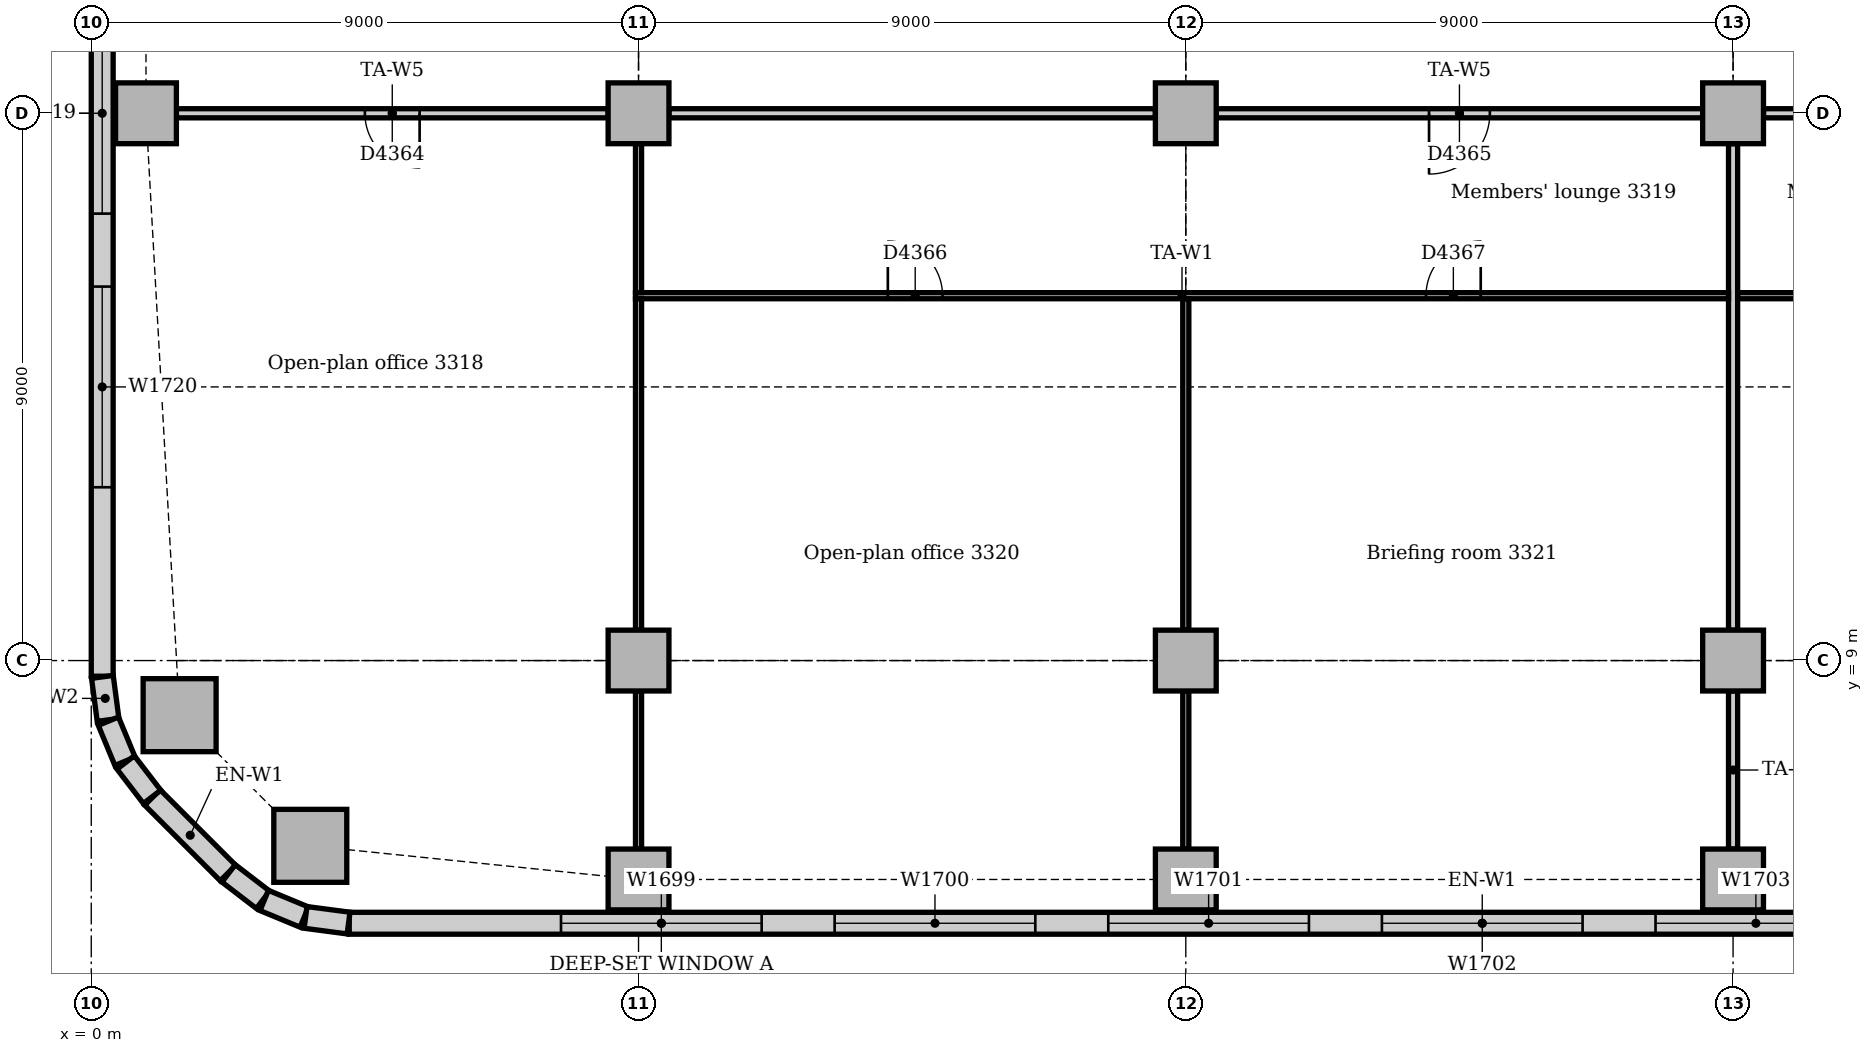
"""IFC4 building model, lengths in metres.
Left out: names, types, materials, properties, quantities, classifications, styles, units other than length and angle.
Written with IfcOpenShell. Run it as: python <this file> out.ifc"""

import sys

from ifc_helpers import new_model, si_unit, direction, frame, frame_2d, origin, origin_2d, place, context, subcontext, project, spatial, rectangle, extrude, element, fill, save


model = new_model("IFC4")
c1 = context("Model", 3, precision=1e-05, world=origin(), true_north=direction((0.0, 1.0)))
c2 = subcontext(c1, "Body", "Model", "MODEL_VIEW")
j1 = project(units=[si_unit("LENGTHUNIT", "METRE"), si_unit("PLANEANGLEUNIT", "RADIAN")], contexts=[c1])
p1 = place(None, origin())
s1 = spatial("IfcSite", under=j1, at=p1, CompositionType="ELEMENT")
p2 = place(p1, origin())
s2 = spatial("IfcBuilding", under=s1, at=p2, CompositionType="ELEMENT")
p3 = place(p2, frame((0.0, 0.0, 140.0)))
s3 = spatial("IfcBuildingStorey", under=s2, at=p3, CompositionType="ELEMENT", Elevation=140.0)
for number, where, z_axis, x_axis in (
    (1, (3.602, 5.953, 0.0), (0.0, 0.0, 1.0), (1.0, 0.0, 0.0)),
    (2, (1.453, 8.102, 0.0), (0.0, 0.0, 1.0), (1.0, 0.0, 0.0)),
):
    element("IfcColumn", number, at=place(p3, frame(where, z_axis=z_axis, x_axis=x_axis)), inside=s3, PredefinedType="COLUMN", context=c2, shape_type="SweptSolid", body=[
        extrude(rectangle(XDim=1.2, YDim=1.2, at=origin_2d()), origin(), (0.0, 0.0, 1.0), 3.7),
    ])
for number, where, z_axis, x_axis in (
    (3, (9.0, 5.4, 0.0), (0.0, 0.0, 1.0), (1.0, 0.0, 0.0)),
    (4, (18.0, 5.4, 0.0), (0.0, 0.0, 1.0), (1.0, 0.0, 0.0)),
    (5, (27.0, 5.4, 0.0), (0.0, 0.0, 1.0), (1.0, 0.0, 0.0)),
    (6, (0.9, 18.0, 0.0), (0.0, 0.0, 1.0), (1.0, 0.0, 0.0)),
    (7, (9.0, 9.0, 0.0), (0.0, 0.0, 1.0), (1.0, 0.0, 0.0)),
    (8, (9.0, 18.0, 0.0), (0.0, 0.0, 1.0), (1.0, 0.0, 0.0)),
    (9, (18.0, 9.0, 0.0), (0.0, 0.0, 1.0), (1.0, 0.0, 0.0)),
    (10, (18.0, 18.0, 0.0), (0.0, 0.0, 1.0), (1.0, 0.0, 0.0)),
    (11, (27.0, 9.0, 0.0), (0.0, 0.0, 1.0), (1.0, 0.0, 0.0)),
    (12, (27.0, 18.0, 0.0), (0.0, 0.0, 1.0), (1.0, 0.0, 0.0)),
):
    element("IfcColumn", number, at=place(p3, frame(where, z_axis=z_axis, x_axis=x_axis)), inside=s3, PredefinedType="COLUMN", context=c2, shape_type="SweptSolid", body=[
        extrude(rectangle(XDim=1.0, YDim=1.0, at=origin_2d()), origin(), (0.0, 0.0, 1.0), 3.7),
    ])
p4 = place(p3, frame((4.243, 4.68, 0.0), z_axis=(0.0, 0.0, 1.0), x_axis=(1.0, 0.0, 0.0)))
e13 = element("IfcWall", 13, at=p4, inside=s3, PredefinedType="STANDARD", context=c2, shape_type="SweptSolid", body=[
    extrude(rectangle(XDim=37.265, YDim=0.36, at=frame_2d((18.632, 0.0))), origin(), (0.0, 0.0, 1.0), 3.7),
])
p5 = place(p4, frame((3.482, 0.0, 0.9)))
e14 = element("IfcOpeningElement", 14, at=p5, cuts=e13, PredefinedType="OPENING", context=c2, shape_type="SweptSolid", body=[
    extrude(rectangle(XDim=3.3, YDim=1.6, at=frame_2d((1.65, 0.8))), frame((0.0, 0.19, 0.0), z_axis=(0.0, -1.0, 0.0), x_axis=(1.0, 0.0, 0.0)), (0.0, 0.0, 1.0), 0.38),
])
p6 = place(p4, frame((7.982, 0.0, 0.9)))
e15 = element("IfcOpeningElement", 15, at=p6, cuts=e13, PredefinedType="OPENING", context=c2, shape_type="SweptSolid", body=[
    extrude(rectangle(XDim=3.3, YDim=1.6, at=frame_2d((1.65, 0.8))), frame((0.0, 0.19, 0.0), z_axis=(0.0, -1.0, 0.0), x_axis=(1.0, 0.0, 0.0)), (0.0, 0.0, 1.0), 0.38),
])
p7 = place(p4, frame((12.482, 0.0, 0.9)))
e16 = element("IfcOpeningElement", 16, at=p7, cuts=e13, PredefinedType="OPENING", context=c2, shape_type="SweptSolid", body=[
    extrude(rectangle(XDim=3.3, YDim=1.6, at=frame_2d((1.65, 0.8))), frame((0.0, 0.19, 0.0), z_axis=(0.0, -1.0, 0.0), x_axis=(1.0, 0.0, 0.0)), (0.0, 0.0, 1.0), 0.38),
])
p8 = place(p4, frame((16.982, 0.0, 0.9)))
e17 = element("IfcOpeningElement", 17, at=p8, cuts=e13, PredefinedType="OPENING", context=c2, shape_type="SweptSolid", body=[
    extrude(rectangle(XDim=3.3, YDim=1.6, at=frame_2d((1.65, 0.8))), frame((0.0, 0.19, 0.0), z_axis=(0.0, -1.0, 0.0), x_axis=(1.0, 0.0, 0.0)), (0.0, 0.0, 1.0), 0.38),
])
p9 = place(p4, frame((21.482, 0.0, 0.9)))
e18 = element("IfcOpeningElement", 18, at=p9, cuts=e13, PredefinedType="OPENING", context=c2, shape_type="SweptSolid", body=[
    extrude(rectangle(XDim=3.3, YDim=1.6, at=frame_2d((1.65, 0.8))), frame((0.0, 0.19, 0.0), z_axis=(0.0, -1.0, 0.0), x_axis=(1.0, 0.0, 0.0)), (0.0, 0.0, 1.0), 0.38),
])
p10 = place(p4, frame((25.982, 0.0, 0.9)))
e19 = element("IfcOpeningElement", 19, at=p10, cuts=e13, PredefinedType="OPENING", context=c2, shape_type="SweptSolid", body=[
    extrude(rectangle(XDim=3.3, YDim=1.6, at=frame_2d((1.65, 0.8))), frame((0.0, 0.19, 0.0), z_axis=(0.0, -1.0, 0.0), x_axis=(1.0, 0.0, 0.0)), (0.0, 0.0, 1.0), 0.38),
])
p11 = place(p4, frame((30.482, 0.0, 0.9)))
e20 = element("IfcOpeningElement", 20, at=p11, cuts=e13, PredefinedType="OPENING", context=c2, shape_type="SweptSolid", body=[
    extrude(rectangle(XDim=3.3, YDim=1.6, at=frame_2d((1.65, 0.8))), frame((0.0, 0.19, 0.0), z_axis=(0.0, -1.0, 0.0), x_axis=(1.0, 0.0, 0.0)), (0.0, 0.0, 1.0), 0.38),
])
p12 = place(p3, frame((0.18, 21.0, 0.0), z_axis=(0.0, 0.0, 1.0), x_axis=(0.0, -1.0, 0.0)))
e21 = element("IfcWall", 21, at=p12, inside=s3, PredefinedType="STANDARD", context=c2, shape_type="SweptSolid", body=[
    extrude(rectangle(XDim=12.257, YDim=0.36, at=frame_2d((6.129, 0.0))), origin(), (0.0, 0.0, 1.0), 3.7),
])
p13 = place(p12, frame((1.35, 0.0, 0.9)))
e22 = element("IfcOpeningElement", 22, at=p13, cuts=e21, PredefinedType="OPENING", context=c2, shape_type="SweptSolid", body=[
    extrude(rectangle(XDim=3.3, YDim=1.6, at=frame_2d((1.65, 0.8))), frame((0.0, 0.19, 0.0), z_axis=(0.0, -1.0, 0.0), x_axis=(1.0, 0.0, 0.0)), (0.0, 0.0, 1.0), 0.38),
])
p14 = place(p12, frame((5.85, 0.0, 0.9)))
e23 = element("IfcOpeningElement", 23, at=p14, cuts=e21, PredefinedType="OPENING", context=c2, shape_type="SweptSolid", body=[
    extrude(rectangle(XDim=3.3, YDim=1.6, at=frame_2d((1.65, 0.8))), frame((0.0, 0.19, 0.0), z_axis=(0.0, -1.0, 0.0), x_axis=(1.0, 0.0, 0.0)), (0.0, 0.0, 1.0), 0.38),
])
p15 = place(p3, frame((1.006, 6.749, 0.0), z_axis=(0.0, 0.0, 1.0), x_axis=(0.707106781187, -0.707106781187, 0.0)))
e24 = element("IfcWall", 24, at=p15, inside=s3, PredefinedType="STANDARD", context=c2, shape_type="SweptSolid", body=[
    extrude(rectangle(XDim=1.757, YDim=0.36, at=frame_2d((0.879, 0.0))), origin(), (0.0, 0.0, 1.0), 3.7),
])
for number, where, z_axis, x_axis in (
    (25, (0.183, 8.731, 0.0), (0.0, 0.0, 1.0), (0.131, -0.991, 0.0)),
    (26, (0.282, 8.003, 0.0), (0.0, 0.0, 1.0), (0.383, -0.924, 0.0)),
):
    element("IfcWall", number, at=place(p3, frame(where, z_axis=z_axis, x_axis=x_axis)), inside=s3, PredefinedType="STANDARD", context=c2, shape_type="SweptSolid", body=[
        extrude(rectangle(XDim=0.713, YDim=0.36, at=frame_2d((0.356, 0.0))), origin(), (0.0, 0.0, 1.0), 3.7),
    ])
for number, where, z_axis, x_axis in (
    (27, (0.566, 7.324, 0.0), (0.0, 0.0, 1.0), (0.609, -0.793, 0.0)),
    (28, (2.259, 5.5, 0.0), (0.0, 0.0, 1.0), (0.793, -0.609, 0.0)),
):
    element("IfcWall", number, at=place(p3, frame(where, z_axis=z_axis, x_axis=x_axis)), inside=s3, PredefinedType="STANDARD", context=c2, shape_type="SweptSolid", body=[
        extrude(rectangle(XDim=0.713, YDim=0.36, at=frame_2d((0.357, 0.0))), origin(), (0.0, 0.0, 1.0), 3.7),
    ])
for number, where, z_axis, x_axis in (
    (29, (2.844, 5.055, 0.0), (0.0, 0.0, 1.0), (0.924, -0.383, 0.0)),
    (30, (3.524, 4.776, 0.0), (0.0, 0.0, 1.0), (0.991, -0.131, 0.0)),
):
    element("IfcWall", number, at=place(p3, frame(where, z_axis=z_axis, x_axis=x_axis)), inside=s3, PredefinedType="STANDARD", context=c2, shape_type="SweptSolid", body=[
        extrude(rectangle(XDim=0.713, YDim=0.36, at=frame_2d((0.356, 0.0))), origin(), (0.0, 0.0, 1.0), 3.7),
    ])
p16 = place(p3, frame((27.5, 18.0, 0.0), z_axis=(0.0, 0.0, 1.0), x_axis=(1.0, 0.0, 0.0)))
e31 = element("IfcWall", 31, at=p16, inside=s3, PredefinedType="PARTITIONING", context=c2, shape_type="SweptSolid", body=[
    extrude(rectangle(XDim=8.0, YDim=0.15, at=frame_2d((4.0, 0.0))), origin(), (0.0, 0.0, 1.0), 3.008),
])
p17 = place(p16, frame((3.5, 0.0, 0.0)))
e32 = element("IfcOpeningElement", 32, at=p17, cuts=e31, PredefinedType="OPENING", context=c2, shape_type="SweptSolid", body=[
    extrude(rectangle(XDim=1.0, YDim=2.1, at=frame_2d((0.5, 1.05))), frame((0.0, 0.085, 0.0), z_axis=(0.0, -1.0, 0.0), x_axis=(1.0, 0.0, 0.0)), (0.0, 0.0, 1.0), 0.17),
])
p18 = place(p3, frame((18.5, 18.0, 0.0), z_axis=(0.0, 0.0, 1.0), x_axis=(1.0, 0.0, 0.0)))
e33 = element("IfcWall", 33, at=p18, inside=s3, PredefinedType="PARTITIONING", context=c2, shape_type="SweptSolid", body=[
    extrude(rectangle(XDim=8.0, YDim=0.15, at=frame_2d((4.0, 0.0))), origin(), (0.0, 0.0, 1.0), 3.008),
])
p19 = place(p18, frame((3.5, 0.0, 0.0)))
e34 = element("IfcOpeningElement", 34, at=p19, cuts=e33, PredefinedType="OPENING", context=c2, shape_type="SweptSolid", body=[
    extrude(rectangle(XDim=1.0, YDim=2.1, at=frame_2d((0.5, 1.05))), frame((0.0, 0.085, 0.0), z_axis=(0.0, -1.0, 0.0), x_axis=(1.0, 0.0, 0.0)), (0.0, 0.0, 1.0), 0.17),
])
p20 = place(p3, frame((9.5, 18.0, 0.0), z_axis=(0.0, 0.0, 1.0), x_axis=(1.0, 0.0, 0.0)))
e35 = element("IfcWall", 35, at=p20, inside=s3, PredefinedType="PARTITIONING", context=c2, shape_type="SweptSolid", body=[
    extrude(rectangle(XDim=8.0, YDim=0.15, at=frame_2d((4.0, 0.0))), origin(), (0.0, 0.0, 1.0), 3.008),
])
p21 = place(p3, frame((1.4, 18.0, 0.0), z_axis=(0.0, 0.0, 1.0), x_axis=(1.0, 0.0, 0.0)))
e36 = element("IfcWall", 36, at=p21, inside=s3, PredefinedType="PARTITIONING", context=c2, shape_type="SweptSolid", body=[
    extrude(rectangle(XDim=7.1, YDim=0.15, at=frame_2d((3.55, 0.0))), origin(), (0.0, 0.0, 1.0), 3.008),
])
p22 = place(p21, frame((3.1, 0.0, 0.0)))
e37 = element("IfcOpeningElement", 37, at=p22, cuts=e36, PredefinedType="OPENING", context=c2, shape_type="SweptSolid", body=[
    extrude(rectangle(XDim=0.9, YDim=2.1, at=frame_2d((0.45, 1.05))), frame((0.0, 0.085, 0.0), z_axis=(0.0, -1.0, 0.0), x_axis=(1.0, 0.0, 0.0)), (0.0, 0.0, 1.0), 0.17),
])
p23 = place(p3, frame((27.0, 5.9, 0.0), z_axis=(0.0, 0.0, 1.0), x_axis=(0.0, 1.0, 0.0)))
e38 = element("IfcWall", 38, at=p23, inside=s3, PredefinedType="PARTITIONING", context=c2, shape_type="SweptSolid", body=[
    extrude(rectangle(XDim=2.6, YDim=0.15, at=frame_2d((1.3, 0.0))), origin(), (0.0, 0.0, 1.0), 3.502),
])
p24 = place(p3, frame((27.0, 9.5, 0.0), z_axis=(0.0, 0.0, 1.0), x_axis=(0.0, 1.0, 0.0)))
e39 = element("IfcWall", 39, at=p24, inside=s3, PredefinedType="PARTITIONING", context=c2, shape_type="SweptSolid", body=[
    extrude(rectangle(XDim=8.0, YDim=0.15, at=frame_2d((4.0, 0.0))), origin(), (0.0, 0.0, 1.0), 3.106),
])
p25 = place(p3, frame((8.95, 15.0, 0.0), z_axis=(0.0, 0.0, 1.0), x_axis=(1.0, 0.0, 0.0)))
e40 = element("IfcWall", 40, at=p25, inside=s3, PredefinedType="PARTITIONING", context=c2, shape_type="SweptSolid", body=[
    extrude(rectangle(XDim=17.975, YDim=0.1, at=frame_2d((8.988, 0.0))), origin(), (0.0, 0.0, 1.0), 3.7),
])
p26 = place(p25, frame((4.15, 0.0, 0.0)))
e41 = element("IfcOpeningElement", 41, at=p26, cuts=e40, PredefinedType="OPENING", context=c2, shape_type="SweptSolid", body=[
    extrude(rectangle(XDim=0.9, YDim=2.1, at=frame_2d((0.45, 1.05))), frame((0.0, 0.06, 0.0), z_axis=(0.0, -1.0, 0.0), x_axis=(1.0, 0.0, 0.0)), (0.0, 0.0, 1.0), 0.12),
])
p27 = place(p25, frame((13.0, 0.0, 0.0)))
e42 = element("IfcOpeningElement", 42, at=p27, cuts=e40, PredefinedType="OPENING", context=c2, shape_type="SweptSolid", body=[
    extrude(rectangle(XDim=0.9, YDim=2.1, at=frame_2d((0.45, 1.05))), frame((0.0, 0.06, 0.0), z_axis=(0.0, -1.0, 0.0), x_axis=(1.0, 0.0, 0.0)), (0.0, 0.0, 1.0), 0.12),
])
p28 = place(p3, frame((27.075, 15.0, 0.0), z_axis=(0.0, 0.0, 1.0), x_axis=(1.0, 0.0, 0.0)))
e43 = element("IfcWall", 43, at=p28, inside=s3, PredefinedType="PARTITIONING", context=c2, shape_type="SweptSolid", body=[
    extrude(rectangle(XDim=8.975, YDim=0.1, at=frame_2d((4.487, 0.0))), origin(), (0.0, 0.0, 1.0), 3.7),
])
p29 = place(p28, frame((4.05, 0.0, 0.0)))
e44 = element("IfcOpeningElement", 44, at=p29, cuts=e43, PredefinedType="OPENING", context=c2, shape_type="SweptSolid", body=[
    extrude(rectangle(XDim=0.9, YDim=2.1, at=frame_2d((0.45, 1.05))), frame((0.0, 0.06, 0.0), z_axis=(0.0, -1.0, 0.0), x_axis=(1.0, 0.0, 0.0)), (0.0, 0.0, 1.0), 0.12),
])
p30 = place(p3, frame((9.0, 5.9, 0.0), z_axis=(0.0, 0.0, 1.0), x_axis=(0.0, 1.0, 0.0)))
e45 = element("IfcWall", 45, at=p30, inside=s3, PredefinedType="PARTITIONING", context=c2, shape_type="SweptSolid", body=[
    extrude(rectangle(XDim=2.6, YDim=0.1, at=frame_2d((1.3, 0.0))), origin(), (0.0, 0.0, 1.0), 3.502),
])
p31 = place(p3, frame((9.0, 15.05, 0.0), z_axis=(0.0, 0.0, 1.0), x_axis=(0.0, 1.0, 0.0)))
e46 = element("IfcWall", 46, at=p31, inside=s3, PredefinedType="PARTITIONING", context=c2, shape_type="SweptSolid", body=[
    extrude(rectangle(XDim=2.45, YDim=0.1, at=frame_2d((1.225, 0.0))), origin(), (0.0, 0.0, 1.0), 3.106),
])
p32 = place(p3, frame((9.0, 9.5, 0.0), z_axis=(0.0, 0.0, 1.0), x_axis=(0.0, 1.0, 0.0)))
e47 = element("IfcWall", 47, at=p32, inside=s3, PredefinedType="PARTITIONING", context=c2, shape_type="SweptSolid", body=[
    extrude(rectangle(XDim=5.45, YDim=0.1, at=frame_2d((2.725, 0.0))), origin(), (0.0, 0.0, 1.0), 3.106),
])
p33 = place(p3, frame((18.0, 5.9, 0.0), z_axis=(0.0, 0.0, 1.0), x_axis=(0.0, 1.0, 0.0)))
e48 = element("IfcWall", 48, at=p33, inside=s3, PredefinedType="PARTITIONING", context=c2, shape_type="SweptSolid", body=[
    extrude(rectangle(XDim=2.6, YDim=0.1, at=frame_2d((1.3, 0.0))), origin(), (0.0, 0.0, 1.0), 3.502),
])
p34 = place(p3, frame((18.0, 9.5, 0.0), z_axis=(0.0, 0.0, 1.0), x_axis=(0.0, 1.0, 0.0)))
e49 = element("IfcWall", 49, at=p34, inside=s3, PredefinedType="PARTITIONING", context=c2, shape_type="SweptSolid", body=[
    extrude(rectangle(XDim=5.45, YDim=0.1, at=frame_2d((2.725, 0.0))), origin(), (0.0, 0.0, 1.0), 3.106),
])
p35 = place(p5, origin())
e50 = element("IfcWindow", 50, at=p35, inside=s3, PartitioningType="SINGLE_PANEL", PredefinedType="WINDOW", context=c2, shape_type="SweptSolid", body=[
    extrude(rectangle(XDim=3.3, YDim=1.6, at=frame_2d((1.65, 0.8))), frame((0.0, 0.13, 0.0), z_axis=(0.0, -1.0, 0.0), x_axis=(1.0, 0.0, 0.0)), (0.0, 0.0, 1.0), 0.06),
])
fill(e14, e50)
p36 = place(p6, origin())
e51 = element("IfcWindow", 51, at=p36, inside=s3, PartitioningType="SINGLE_PANEL", PredefinedType="WINDOW", context=c2, shape_type="SweptSolid", body=[
    extrude(rectangle(XDim=3.3, YDim=1.6, at=frame_2d((1.65, 0.8))), frame((0.0, 0.13, 0.0), z_axis=(0.0, -1.0, 0.0), x_axis=(1.0, 0.0, 0.0)), (0.0, 0.0, 1.0), 0.06),
])
fill(e15, e51)
p37 = place(p7, origin())
e52 = element("IfcWindow", 52, at=p37, inside=s3, PartitioningType="SINGLE_PANEL", PredefinedType="WINDOW", context=c2, shape_type="SweptSolid", body=[
    extrude(rectangle(XDim=3.3, YDim=1.6, at=frame_2d((1.65, 0.8))), frame((0.0, 0.13, 0.0), z_axis=(0.0, -1.0, 0.0), x_axis=(1.0, 0.0, 0.0)), (0.0, 0.0, 1.0), 0.06),
])
fill(e16, e52)
p38 = place(p8, origin())
e53 = element("IfcWindow", 53, at=p38, inside=s3, PartitioningType="SINGLE_PANEL", PredefinedType="WINDOW", context=c2, shape_type="SweptSolid", body=[
    extrude(rectangle(XDim=3.3, YDim=1.6, at=frame_2d((1.65, 0.8))), frame((0.0, 0.13, 0.0), z_axis=(0.0, -1.0, 0.0), x_axis=(1.0, 0.0, 0.0)), (0.0, 0.0, 1.0), 0.06),
])
fill(e17, e53)
p39 = place(p9, origin())
e54 = element("IfcWindow", 54, at=p39, inside=s3, PartitioningType="SINGLE_PANEL", PredefinedType="WINDOW", context=c2, shape_type="SweptSolid", body=[
    extrude(rectangle(XDim=3.3, YDim=1.6, at=frame_2d((1.65, 0.8))), frame((0.0, 0.13, 0.0), z_axis=(0.0, -1.0, 0.0), x_axis=(1.0, 0.0, 0.0)), (0.0, 0.0, 1.0), 0.06),
])
fill(e18, e54)
p40 = place(p13, origin())
e55 = element("IfcWindow", 55, at=p40, inside=s3, PartitioningType="SINGLE_PANEL", PredefinedType="WINDOW", context=c2, shape_type="SweptSolid", body=[
    extrude(rectangle(XDim=3.3, YDim=1.6, at=frame_2d((1.65, 0.8))), frame((0.0, 0.13, 0.0), z_axis=(0.0, -1.0, 0.0), x_axis=(1.0, 0.0, 0.0)), (0.0, 0.0, 1.0), 0.06),
])
fill(e22, e55)
p41 = place(p14, origin())
e56 = element("IfcWindow", 56, at=p41, inside=s3, PartitioningType="SINGLE_PANEL", PredefinedType="WINDOW", context=c2, shape_type="SweptSolid", body=[
    extrude(rectangle(XDim=3.3, YDim=1.6, at=frame_2d((1.65, 0.8))), frame((0.0, 0.13, 0.0), z_axis=(0.0, -1.0, 0.0), x_axis=(1.0, 0.0, 0.0)), (0.0, 0.0, 1.0), 0.06),
])
fill(e23, e56)
p42 = place(p22, frame((0.9, 0.0, 0.0), z_axis=(0.0, 0.0, 1.0), x_axis=(-1.0, 0.0, 0.0)))
e57 = element("IfcDoor", 57, at=p42, inside=s3, OperationType="SINGLE_SWING_LEFT", PredefinedType="DOOR", context=c2, shape_type="SweptSolid", body=[
    extrude(rectangle(XDim=0.9, YDim=2.1, at=frame_2d((0.45, 1.05))), frame((0.0, 0.025, 0.0), z_axis=(0.0, -1.0, 0.0), x_axis=(1.0, 0.0, 0.0)), (0.0, 0.0, 1.0), 0.05),
])
fill(e37, e57)
p43 = place(p19, frame((1.0, 0.0, 0.0), z_axis=(0.0, 0.0, 1.0), x_axis=(-1.0, 0.0, 0.0)))
e58 = element("IfcDoor", 58, at=p43, inside=s3, OperationType="SINGLE_SWING_RIGHT", PredefinedType="DOOR", context=c2, shape_type="SweptSolid", body=[
    extrude(rectangle(XDim=1.0, YDim=2.1, at=frame_2d((0.5, 1.05))), frame((0.0, 0.025, 0.0), z_axis=(0.0, -1.0, 0.0), x_axis=(1.0, 0.0, 0.0)), (0.0, 0.0, 1.0), 0.05),
])
fill(e34, e58)
p44 = place(p26, origin())
e59 = element("IfcDoor", 59, at=p44, inside=s3, OperationType="SINGLE_SWING_LEFT", PredefinedType="DOOR", context=c2, shape_type="SweptSolid", body=[
    extrude(rectangle(XDim=0.9, YDim=2.1, at=frame_2d((0.45, 1.05))), frame((0.0, 0.025, 0.0), z_axis=(0.0, -1.0, 0.0), x_axis=(1.0, 0.0, 0.0)), (0.0, 0.0, 1.0), 0.05),
])
fill(e41, e59)
p45 = place(p27, origin())
e60 = element("IfcDoor", 60, at=p45, inside=s3, OperationType="SINGLE_SWING_RIGHT", PredefinedType="DOOR", context=c2, shape_type="SweptSolid", body=[
    extrude(rectangle(XDim=0.9, YDim=2.1, at=frame_2d((0.45, 1.05))), frame((0.0, 0.025, 0.0), z_axis=(0.0, -1.0, 0.0), x_axis=(1.0, 0.0, 0.0)), (0.0, 0.0, 1.0), 0.05),
])
fill(e42, e60)
save(model, sys.argv[1])
